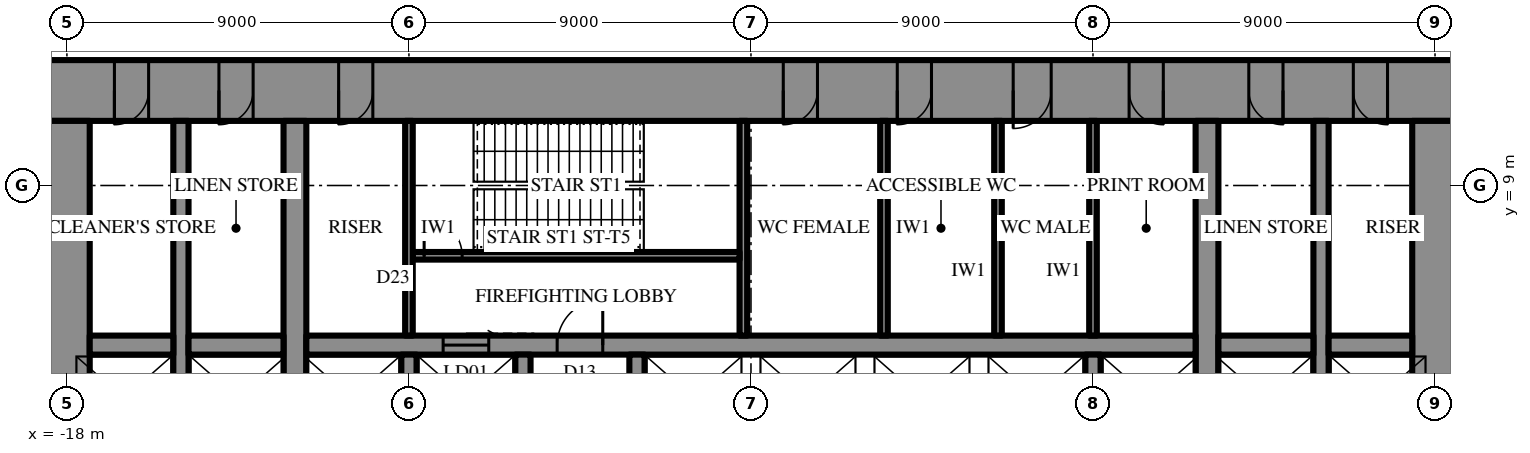
"""IFC4 building model, lengths in metres.
Left out: names, types, materials, properties, quantities, classifications, styles, units other than length and angle.
Written with IfcOpenShell. Run it as: python <this file> out.ifc"""

import sys

from ifc_helpers import new_model, si_unit, direction, frame, frame_2d, origin, place, context, subcontext, project, spatial, rectangle, extrude, element, fill, save


model = new_model("IFC4")
c1 = context("Model", 3, precision=1e-05, world=origin(), true_north=direction((0.0, 1.0)))
c2 = subcontext(c1, "Body", "Model", "MODEL_VIEW")
j1 = project(units=[si_unit("LENGTHUNIT", "METRE"), si_unit("PLANEANGLEUNIT", "RADIAN")], contexts=[c1])
p1 = place(None, origin())
s1 = spatial("IfcSite", under=j1, at=p1, CompositionType="ELEMENT")
p2 = place(p1, origin())
s2 = spatial("IfcBuilding", under=s1, at=p2, CompositionType="ELEMENT")
p3 = place(p2, frame((0.0, 0.0, 7.0)))
s3 = spatial("IfcBuildingStorey", under=s2, at=p3, CompositionType="ELEMENT", Elevation=7.0)
p4 = place(p3, frame((-18.6, 11.5, 0.0), z_axis=(0.0, 0.0, 1.0), x_axis=(1.0, 0.0, 0.0)))
e1 = element("IfcWall", 1, at=p4, inside=s3, PredefinedType="SHEAR", context=c2, shape_type="SweptSolid", body=[
    extrude(rectangle(XDim=37.2, YDim=1.6, at=frame_2d((18.6, 0.0))), origin(), (0.0, 0.0, 1.0), 6.0),
])
p5 = place(p4, frame((19.45, 0.0, 0.0)))
e2 = element("IfcOpeningElement", 2, at=p5, cuts=e1, PredefinedType="OPENING", context=c2, shape_type="SweptSolid", body=[
    extrude(rectangle(XDim=0.9, YDim=2.2, at=frame_2d((0.45, 1.1))), frame((0.0, 0.81, 0.0), z_axis=(0.0, -1.0, 0.0), x_axis=(1.0, 0.0, 0.0)), (0.0, 0.0, 1.0), 1.62),
])
p6 = place(p4, frame((22.45, 0.0, 0.0)))
e3 = element("IfcOpeningElement", 3, at=p6, cuts=e1, PredefinedType="OPENING", context=c2, shape_type="SweptSolid", body=[
    extrude(rectangle(XDim=0.9, YDim=2.2, at=frame_2d((0.45, 1.1))), frame((0.0, 0.81, 0.0), z_axis=(0.0, -1.0, 0.0), x_axis=(1.0, 0.0, 0.0)), (0.0, 0.0, 1.0), 1.62),
])
p7 = place(p4, frame((25.5, 0.0, 0.0)))
e4 = element("IfcOpeningElement", 4, at=p7, cuts=e1, PredefinedType="OPENING", context=c2, shape_type="SweptSolid", body=[
    extrude(rectangle(XDim=1.0, YDim=2.2, at=frame_2d((0.5, 1.1))), frame((0.0, 0.81, 0.0), z_axis=(0.0, -1.0, 0.0), x_axis=(1.0, 0.0, 0.0)), (0.0, 0.0, 1.0), 1.62),
])
p8 = place(p4, frame((1.85, 0.0, 0.0)))
e5 = element("IfcOpeningElement", 5, at=p8, cuts=e1, PredefinedType="OPENING", context=c2, shape_type="SweptSolid", body=[
    extrude(rectangle(XDim=0.9, YDim=2.2, at=frame_2d((0.45, 1.1))), frame((0.0, 0.81, 0.0), z_axis=(0.0, -1.0, 0.0), x_axis=(1.0, 0.0, 0.0)), (0.0, 0.0, 1.0), 1.62),
])
p9 = place(p4, frame((4.6, 0.0, 0.0)))
e6 = element("IfcOpeningElement", 6, at=p9, cuts=e1, PredefinedType="OPENING", context=c2, shape_type="SweptSolid", body=[
    extrude(rectangle(XDim=0.9, YDim=2.2, at=frame_2d((0.45, 1.1))), frame((0.0, 0.81, 0.0), z_axis=(0.0, -1.0, 0.0), x_axis=(1.0, 0.0, 0.0)), (0.0, 0.0, 1.0), 1.62),
])
p10 = place(p4, frame((7.75, 0.0, 0.0)))
e7 = element("IfcOpeningElement", 7, at=p10, cuts=e1, PredefinedType="OPENING", context=c2, shape_type="SweptSolid", body=[
    extrude(rectangle(XDim=0.9, YDim=2.2, at=frame_2d((0.45, 1.1))), frame((0.0, 0.81, 0.0), z_axis=(0.0, -1.0, 0.0), x_axis=(1.0, 0.0, 0.0)), (0.0, 0.0, 1.0), 1.62),
])
p11 = place(p4, frame((28.55, 0.0, 0.0)))
e8 = element("IfcOpeningElement", 8, at=p11, cuts=e1, PredefinedType="OPENING", context=c2, shape_type="SweptSolid", body=[
    extrude(rectangle(XDim=0.9, YDim=2.2, at=frame_2d((0.45, 1.1))), frame((0.0, 0.81, 0.0), z_axis=(0.0, -1.0, 0.0), x_axis=(1.0, 0.0, 0.0)), (0.0, 0.0, 1.0), 1.62),
])
p12 = place(p4, frame((31.7, 0.0, 0.0)))
e9 = element("IfcOpeningElement", 9, at=p12, cuts=e1, PredefinedType="OPENING", context=c2, shape_type="SweptSolid", body=[
    extrude(rectangle(XDim=0.9, YDim=2.2, at=frame_2d((0.45, 1.1))), frame((0.0, 0.81, 0.0), z_axis=(0.0, -1.0, 0.0), x_axis=(1.0, 0.0, 0.0)), (0.0, 0.0, 1.0), 1.62),
])
p13 = place(p4, frame((34.45, 0.0, 0.0)))
e10 = element("IfcOpeningElement", 10, at=p13, cuts=e1, PredefinedType="OPENING", context=c2, shape_type="SweptSolid", body=[
    extrude(rectangle(XDim=0.9, YDim=2.2, at=frame_2d((0.45, 1.1))), frame((0.0, 0.81, 0.0), z_axis=(0.0, -1.0, 0.0), x_axis=(1.0, 0.0, 0.0)), (0.0, 0.0, 1.0), 1.62),
])
p14 = place(p3, frame((18.0, -10.7, 0.0), z_axis=(0.0, 0.0, 1.0), x_axis=(0.0, 1.0, 0.0)))
e11 = element("IfcWall", 11, at=p14, inside=s3, PredefinedType="SHEAR", context=c2, shape_type="SweptSolid", body=[
    extrude(rectangle(XDim=21.4, YDim=1.2, at=frame_2d((10.7, 0.0))), origin(), (0.0, 0.0, 1.0), 6.0),
])
p15 = place(p14, frame((9.8, 0.0, 0.0)))
e12 = element("IfcOpeningElement", 12, at=p15, cuts=e11, PredefinedType="OPENING", context=c2, shape_type="SweptSolid", body=[
    extrude(rectangle(XDim=1.8, YDim=2.4, at=frame_2d((0.9, 1.2))), frame((0.0, 0.61, 0.0), z_axis=(0.0, -1.0, 0.0), x_axis=(1.0, 0.0, 0.0)), (0.0, 0.0, 1.0), 1.22),
])
p16 = place(p3, frame((-18.0, 10.7, 0.0), z_axis=(0.0, 0.0, 1.0), x_axis=(0.0, -1.0, 0.0)))
e13 = element("IfcWall", 13, at=p16, inside=s3, PredefinedType="SHEAR", context=c2, shape_type="SweptSolid", body=[
    extrude(rectangle(XDim=21.4, YDim=1.2, at=frame_2d((10.7, 0.0))), origin(), (0.0, 0.0, 1.0), 6.0),
])
p17 = place(p16, frame((9.8, 0.0, 0.0)))
e14 = element("IfcOpeningElement", 14, at=p17, cuts=e13, PredefinedType="OPENING", context=c2, shape_type="SweptSolid", body=[
    extrude(rectangle(XDim=1.8, YDim=2.4, at=frame_2d((0.9, 1.2))), frame((0.0, 0.61, 0.0), z_axis=(0.0, -1.0, 0.0), x_axis=(1.0, 0.0, 0.0)), (0.0, 0.0, 1.0), 1.22),
])
p18 = place(p3, frame((12.0, -10.7, 0.0), z_axis=(0.0, 0.0, 1.0), x_axis=(0.0, 1.0, 0.0)))
e15 = element("IfcWall", 15, at=p18, inside=s3, PredefinedType="SHEAR", context=c2, shape_type="SweptSolid", body=[
    extrude(rectangle(XDim=21.4, YDim=0.6, at=frame_2d((10.7, 0.0))), origin(), (0.0, 0.0, 1.0), 6.0),
])
p19 = place(p18, frame((9.8, 0.0, 0.0)))
e16 = element("IfcOpeningElement", 16, at=p19, cuts=e15, PredefinedType="OPENING", context=c2, shape_type="SweptSolid", body=[
    extrude(rectangle(XDim=1.8, YDim=2.4, at=frame_2d((0.9, 1.2))), frame((0.0, 0.31, 0.0), z_axis=(0.0, -1.0, 0.0), x_axis=(1.0, 0.0, 0.0)), (0.0, 0.0, 1.0), 0.62),
])
p20 = place(p3, frame((-12.0, -10.7, 0.0), z_axis=(0.0, 0.0, 1.0), x_axis=(0.0, 1.0, 0.0)))
e17 = element("IfcWall", 17, at=p20, inside=s3, PredefinedType="SHEAR", context=c2, shape_type="SweptSolid", body=[
    extrude(rectangle(XDim=21.4, YDim=0.6, at=frame_2d((10.7, 0.0))), origin(), (0.0, 0.0, 1.0), 6.0),
])
p21 = place(p20, frame((9.8, 0.0, 0.0)))
e18 = element("IfcOpeningElement", 18, at=p21, cuts=e17, PredefinedType="OPENING", context=c2, shape_type="SweptSolid", body=[
    extrude(rectangle(XDim=1.8, YDim=2.4, at=frame_2d((0.9, 1.2))), frame((0.0, 0.31, 0.0), z_axis=(0.0, -1.0, 0.0), x_axis=(1.0, 0.0, 0.0)), (0.0, 0.0, 1.0), 0.62),
])
p22 = place(p3, frame((15.0, -10.7, 0.0), z_axis=(0.0, 0.0, 1.0), x_axis=(0.0, 1.0, 0.0)))
e19 = element("IfcWall", 19, at=p22, inside=s3, PredefinedType="SHEAR", context=c2, shape_type="SweptSolid", body=[
    extrude(rectangle(XDim=21.4, YDim=0.4, at=frame_2d((10.7, 0.0))), origin(), (0.0, 0.0, 1.0), 6.0),
])
p23 = place(p22, frame((9.8, 0.0, 0.0)))
e20 = element("IfcOpeningElement", 20, at=p23, cuts=e19, PredefinedType="OPENING", context=c2, shape_type="SweptSolid", body=[
    extrude(rectangle(XDim=1.8, YDim=2.4, at=frame_2d((0.9, 1.2))), frame((0.0, 0.21, 0.0), z_axis=(0.0, -1.0, 0.0), x_axis=(1.0, 0.0, 0.0)), (0.0, 0.0, 1.0), 0.42),
])
p24 = place(p3, frame((-15.0, -10.7, 0.0), z_axis=(0.0, 0.0, 1.0), x_axis=(0.0, 1.0, 0.0)))
e21 = element("IfcWall", 21, at=p24, inside=s3, PredefinedType="SHEAR", context=c2, shape_type="SweptSolid", body=[
    extrude(rectangle(XDim=21.4, YDim=0.4, at=frame_2d((10.7, 0.0))), origin(), (0.0, 0.0, 1.0), 6.0),
])
p25 = place(p24, frame((9.8, 0.0, 0.0)))
e22 = element("IfcOpeningElement", 22, at=p25, cuts=e21, PredefinedType="OPENING", context=c2, shape_type="SweptSolid", body=[
    extrude(rectangle(XDim=1.8, YDim=2.4, at=frame_2d((0.9, 1.2))), frame((0.0, 0.21, 0.0), z_axis=(0.0, -1.0, 0.0), x_axis=(1.0, 0.0, 0.0)), (0.0, 0.0, 1.0), 0.42),
])
p26 = place(p3, frame((-17.4, 4.8, 0.0), z_axis=(0.0, 0.0, 1.0), x_axis=(1.0, 0.0, 0.0)))
e23 = element("IfcWall", 23, at=p26, inside=s3, PredefinedType="SHEAR", context=c2, shape_type="SweptSolid", body=[
    extrude(rectangle(XDim=2.2, YDim=0.5, at=frame_2d((1.1, 0.0))), origin(), (0.0, 0.0, 1.0), 6.0),
])
p27 = place(p3, frame((-14.8, 4.8, 0.0), z_axis=(0.0, 0.0, 1.0), x_axis=(1.0, 0.0, 0.0)))
e24 = element("IfcWall", 24, at=p27, inside=s3, PredefinedType="SHEAR", context=c2, shape_type="SweptSolid", body=[
    extrude(rectangle(XDim=2.5, YDim=0.5, at=frame_2d((1.25, 0.0))), origin(), (0.0, 0.0, 1.0), 6.0),
])
p28 = place(p3, frame((-11.7, 4.8, 0.0), z_axis=(0.0, 0.0, 1.0), x_axis=(1.0, 0.0, 0.0)))
e25 = element("IfcWall", 25, at=p28, inside=s3, PredefinedType="SHEAR", context=c2, shape_type="SweptSolid", body=[
    extrude(rectangle(XDim=23.4, YDim=0.5, at=frame_2d((11.7, 0.0))), origin(), (0.0, 0.0, 1.0), 6.0),
])
p29 = place(p28, frame((6.6, 0.0, 0.0)))
e26 = element("IfcOpeningElement", 26, at=p29, cuts=e25, PredefinedType="OPENING", context=c2, shape_type="SweptSolid", body=[
    extrude(rectangle(XDim=1.2, YDim=2.2, at=frame_2d((0.6, 1.1))), frame((0.0, 0.26, 0.0), z_axis=(0.0, -1.0, 0.0), x_axis=(1.0, 0.0, 0.0)), (0.0, 0.0, 1.0), 0.52),
])
p30 = place(p28, frame((3.6, 0.0, 0.0)))
e27 = element("IfcOpeningElement", 27, at=p30, cuts=e25, PredefinedType="OPENING", context=c2, shape_type="SweptSolid", body=[
    extrude(rectangle(XDim=1.2, YDim=2.2, at=frame_2d((0.6, 1.1))), frame((0.0, 0.26, 0.0), z_axis=(0.0, -1.0, 0.0), x_axis=(1.0, 0.0, 0.0)), (0.0, 0.0, 1.0), 0.52),
])
p31 = place(p3, frame((12.3, 4.8, 0.0), z_axis=(0.0, 0.0, 1.0), x_axis=(1.0, 0.0, 0.0)))
e28 = element("IfcWall", 28, at=p31, inside=s3, PredefinedType="SHEAR", context=c2, shape_type="SweptSolid", body=[
    extrude(rectangle(XDim=2.5, YDim=0.5, at=frame_2d((1.25, 0.0))), origin(), (0.0, 0.0, 1.0), 6.0),
])
p32 = place(p3, frame((15.2, 4.8, 0.0), z_axis=(0.0, 0.0, 1.0), x_axis=(1.0, 0.0, 0.0)))
e29 = element("IfcWall", 29, at=p32, inside=s3, PredefinedType="SHEAR", context=c2, shape_type="SweptSolid", body=[
    extrude(rectangle(XDim=2.2, YDim=0.5, at=frame_2d((1.1, 0.0))), origin(), (0.0, 0.0, 1.0), 6.0),
])
for number, where, z_axis, x_axis in (
    (30, (-9.0, 2.25, 0.0), (0.0, 0.0, 1.0), (0.0, 1.0, 0.0)),
    (31, (-6.0, 2.25, 0.0), (0.0, 0.0, 1.0), (0.0, 1.0, 0.0)),
    (32, (-3.0, 2.25, 0.0), (0.0, 0.0, 1.0), (0.0, 1.0, 0.0)),
    (33, (9.0, 2.25, 0.0), (0.0, 0.0, 1.0), (0.0, 1.0, 0.0)),
):
    element("IfcWall", number, at=place(p3, frame(where, z_axis=z_axis, x_axis=x_axis)), inside=s3, PredefinedType="SHEAR", context=c2, shape_type="SweptSolid", body=[
        extrude(rectangle(XDim=2.3, YDim=0.4, at=frame_2d((1.15, 0.0))), origin(), (0.0, 0.0, 1.0), 6.0),
    ])
p33 = place(p3, frame((-0.2, 5.05, 0.0), z_axis=(0.0, 0.0, 1.0), x_axis=(0.0, 1.0, 0.0)))
e34 = element("IfcWall", 34, at=p33, inside=s3, PredefinedType="SHEAR", context=c2, shape_type="SweptSolid", body=[
    extrude(rectangle(XDim=5.65, YDim=0.2, at=frame_2d((2.825, 0.0))), origin(), (0.0, 0.0, 1.0), 6.0),
])
p34 = place(p3, frame((-8.9, 7.15, 0.0), z_axis=(0.0, 0.0, 1.0), x_axis=(1.0, 0.0, 0.0)))
e35 = element("IfcWall", 35, at=p34, inside=s3, PredefinedType="SHEAR", context=c2, shape_type="SweptSolid", body=[
    extrude(rectangle(XDim=8.6, YDim=0.2, at=frame_2d((4.3, 0.0))), origin(), (0.0, 0.0, 1.0), 6.0),
])
p35 = place(p34, frame((0.3, 0.0, 0.0)))
e36 = element("IfcOpeningElement", 36, at=p35, cuts=e35, PredefinedType="OPENING", context=c2, shape_type="SweptSolid", body=[
    extrude(rectangle(XDim=1.0, YDim=2.2, at=frame_2d((0.5, 1.1))), frame((0.0, 0.11, 0.0), z_axis=(0.0, -1.0, 0.0), x_axis=(1.0, 0.0, 0.0)), (0.0, 0.0, 1.0), 0.22),
])
for number, where, z_axis, x_axis in (
    (37, (-9.0, 5.05, 0.0), (0.0, 0.0, 1.0), (0.0, 1.0, 0.0)),
    (38, (9.0, 5.05, 0.0), (0.0, 0.0, 1.0), (0.0, 1.0, 0.0)),
    (39, (3.5, 5.05, 0.0), (0.0, 0.0, 1.0), (0.0, 1.0, 0.0)),
    (40, (6.5, 5.05, 0.0), (0.0, 0.0, 1.0), (0.0, 1.0, 0.0)),
):
    element("IfcWall", number, at=place(p3, frame(where, z_axis=z_axis, x_axis=x_axis)), inside=s3, PredefinedType="PARTITIONING", context=c2, shape_type="SweptSolid", body=[
        extrude(rectangle(XDim=5.65, YDim=0.2, at=frame_2d((2.825, 0.0))), origin(), (0.0, 0.0, 1.0), 5.65),
    ])
p36 = place(p29, origin())
e41 = element("IfcDoor", 41, at=p36, inside=s3, OperationType="SINGLE_SWING_LEFT", PredefinedType="DOOR", context=c2, shape_type="SweptSolid", body=[
    extrude(rectangle(XDim=1.2, YDim=2.2, at=frame_2d((0.6, 1.1))), frame((0.0, 0.025, 0.0), z_axis=(0.0, -1.0, 0.0), x_axis=(1.0, 0.0, 0.0)), (0.0, 0.0, 1.0), 0.05),
])
fill(e26, e41)
p37 = place(p35, origin())
e42 = element("IfcDoor", 42, at=p37, inside=s3, OperationType="SINGLE_SWING_RIGHT", PredefinedType="DOOR", context=c2, shape_type="SweptSolid", body=[
    extrude(rectangle(XDim=1.0, YDim=2.2, at=frame_2d((0.5, 1.1))), frame((0.0, 0.025, 0.0), z_axis=(0.0, -1.0, 0.0), x_axis=(1.0, 0.0, 0.0)), (0.0, 0.0, 1.0), 0.05),
])
fill(e36, e42)
p38 = place(p5, frame((0.9, 0.0, 0.0), z_axis=(0.0, 0.0, 1.0), x_axis=(-1.0, 0.0, 0.0)))
e43 = element("IfcDoor", 43, at=p38, inside=s3, OperationType="SINGLE_SWING_LEFT", PredefinedType="DOOR", context=c2, shape_type="SweptSolid", body=[
    extrude(rectangle(XDim=0.9, YDim=2.2, at=frame_2d((0.45, 1.1))), frame((0.0, 0.025, 0.0), z_axis=(0.0, -1.0, 0.0), x_axis=(1.0, 0.0, 0.0)), (0.0, 0.0, 1.0), 0.05),
])
fill(e2, e43)
p39 = place(p6, frame((0.9, 0.0, 0.0), z_axis=(0.0, 0.0, 1.0), x_axis=(-1.0, 0.0, 0.0)))
e44 = element("IfcDoor", 44, at=p39, inside=s3, OperationType="SINGLE_SWING_LEFT", PredefinedType="DOOR", context=c2, shape_type="SweptSolid", body=[
    extrude(rectangle(XDim=0.9, YDim=2.2, at=frame_2d((0.45, 1.1))), frame((0.0, 0.025, 0.0), z_axis=(0.0, -1.0, 0.0), x_axis=(1.0, 0.0, 0.0)), (0.0, 0.0, 1.0), 0.05),
])
fill(e3, e44)
p40 = place(p7, frame((1.0, 0.0, 0.0), z_axis=(0.0, 0.0, 1.0), x_axis=(-1.0, 0.0, 0.0)))
e45 = element("IfcDoor", 45, at=p40, inside=s3, OperationType="SINGLE_SWING_LEFT", PredefinedType="DOOR", context=c2, shape_type="SweptSolid", body=[
    extrude(rectangle(XDim=1.0, YDim=2.2, at=frame_2d((0.5, 1.1))), frame((0.0, 0.025, 0.0), z_axis=(0.0, -1.0, 0.0), x_axis=(1.0, 0.0, 0.0)), (0.0, 0.0, 1.0), 0.05),
])
fill(e4, e45)
p41 = place(p8, frame((0.9, 0.0, 0.0), z_axis=(0.0, 0.0, 1.0), x_axis=(-1.0, 0.0, 0.0)))
e46 = element("IfcDoor", 46, at=p41, inside=s3, OperationType="SINGLE_SWING_LEFT", PredefinedType="DOOR", context=c2, shape_type="SweptSolid", body=[
    extrude(rectangle(XDim=0.9, YDim=2.2, at=frame_2d((0.45, 1.1))), frame((0.0, 0.025, 0.0), z_axis=(0.0, -1.0, 0.0), x_axis=(1.0, 0.0, 0.0)), (0.0, 0.0, 1.0), 0.05),
])
fill(e5, e46)
p42 = place(p9, frame((0.9, 0.0, 0.0), z_axis=(0.0, 0.0, 1.0), x_axis=(-1.0, 0.0, 0.0)))
e47 = element("IfcDoor", 47, at=p42, inside=s3, OperationType="SINGLE_SWING_LEFT", PredefinedType="DOOR", context=c2, shape_type="SweptSolid", body=[
    extrude(rectangle(XDim=0.9, YDim=2.2, at=frame_2d((0.45, 1.1))), frame((0.0, 0.025, 0.0), z_axis=(0.0, -1.0, 0.0), x_axis=(1.0, 0.0, 0.0)), (0.0, 0.0, 1.0), 0.05),
])
fill(e6, e47)
p43 = place(p10, frame((0.9, 0.0, 0.0), z_axis=(0.0, 0.0, 1.0), x_axis=(-1.0, 0.0, 0.0)))
e48 = element("IfcDoor", 48, at=p43, inside=s3, OperationType="SINGLE_SWING_LEFT", PredefinedType="DOOR", context=c2, shape_type="SweptSolid", body=[
    extrude(rectangle(XDim=0.9, YDim=2.2, at=frame_2d((0.45, 1.1))), frame((0.0, 0.025, 0.0), z_axis=(0.0, -1.0, 0.0), x_axis=(1.0, 0.0, 0.0)), (0.0, 0.0, 1.0), 0.05),
])
fill(e7, e48)
p44 = place(p11, frame((0.9, 0.0, 0.0), z_axis=(0.0, 0.0, 1.0), x_axis=(-1.0, 0.0, 0.0)))
e49 = element("IfcDoor", 49, at=p44, inside=s3, OperationType="SINGLE_SWING_RIGHT", PredefinedType="DOOR", context=c2, shape_type="SweptSolid", body=[
    extrude(rectangle(XDim=0.9, YDim=2.2, at=frame_2d((0.45, 1.1))), frame((0.0, 0.025, 0.0), z_axis=(0.0, -1.0, 0.0), x_axis=(1.0, 0.0, 0.0)), (0.0, 0.0, 1.0), 0.05),
])
fill(e8, e49)
p45 = place(p12, frame((0.9, 0.0, 0.0), z_axis=(0.0, 0.0, 1.0), x_axis=(-1.0, 0.0, 0.0)))
e50 = element("IfcDoor", 50, at=p45, inside=s3, OperationType="SINGLE_SWING_RIGHT", PredefinedType="DOOR", context=c2, shape_type="SweptSolid", body=[
    extrude(rectangle(XDim=0.9, YDim=2.2, at=frame_2d((0.45, 1.1))), frame((0.0, 0.025, 0.0), z_axis=(0.0, -1.0, 0.0), x_axis=(1.0, 0.0, 0.0)), (0.0, 0.0, 1.0), 0.05),
])
fill(e9, e50)
p46 = place(p13, frame((0.9, 0.0, 0.0), z_axis=(0.0, 0.0, 1.0), x_axis=(-1.0, 0.0, 0.0)))
e51 = element("IfcDoor", 51, at=p46, inside=s3, OperationType="SINGLE_SWING_RIGHT", PredefinedType="DOOR", context=c2, shape_type="SweptSolid", body=[
    extrude(rectangle(XDim=0.9, YDim=2.2, at=frame_2d((0.45, 1.1))), frame((0.0, 0.025, 0.0), z_axis=(0.0, -1.0, 0.0), x_axis=(1.0, 0.0, 0.0)), (0.0, 0.0, 1.0), 0.05),
])
fill(e10, e51)
p47 = place(p30, origin())
e52 = element("IfcDoor", 52, at=p47, inside=s3, OperationType="SLIDING_TO_LEFT", PredefinedType="DOOR", context=c2, shape_type="SweptSolid", body=[
    extrude(rectangle(XDim=1.2, YDim=2.2, at=frame_2d((0.6, 1.1))), frame((0.0, 0.025, 0.0), z_axis=(0.0, -1.0, 0.0), x_axis=(1.0, 0.0, 0.0)), (0.0, 0.0, 1.0), 0.05),
])
fill(e27, e52)
save(model, sys.argv[1])
